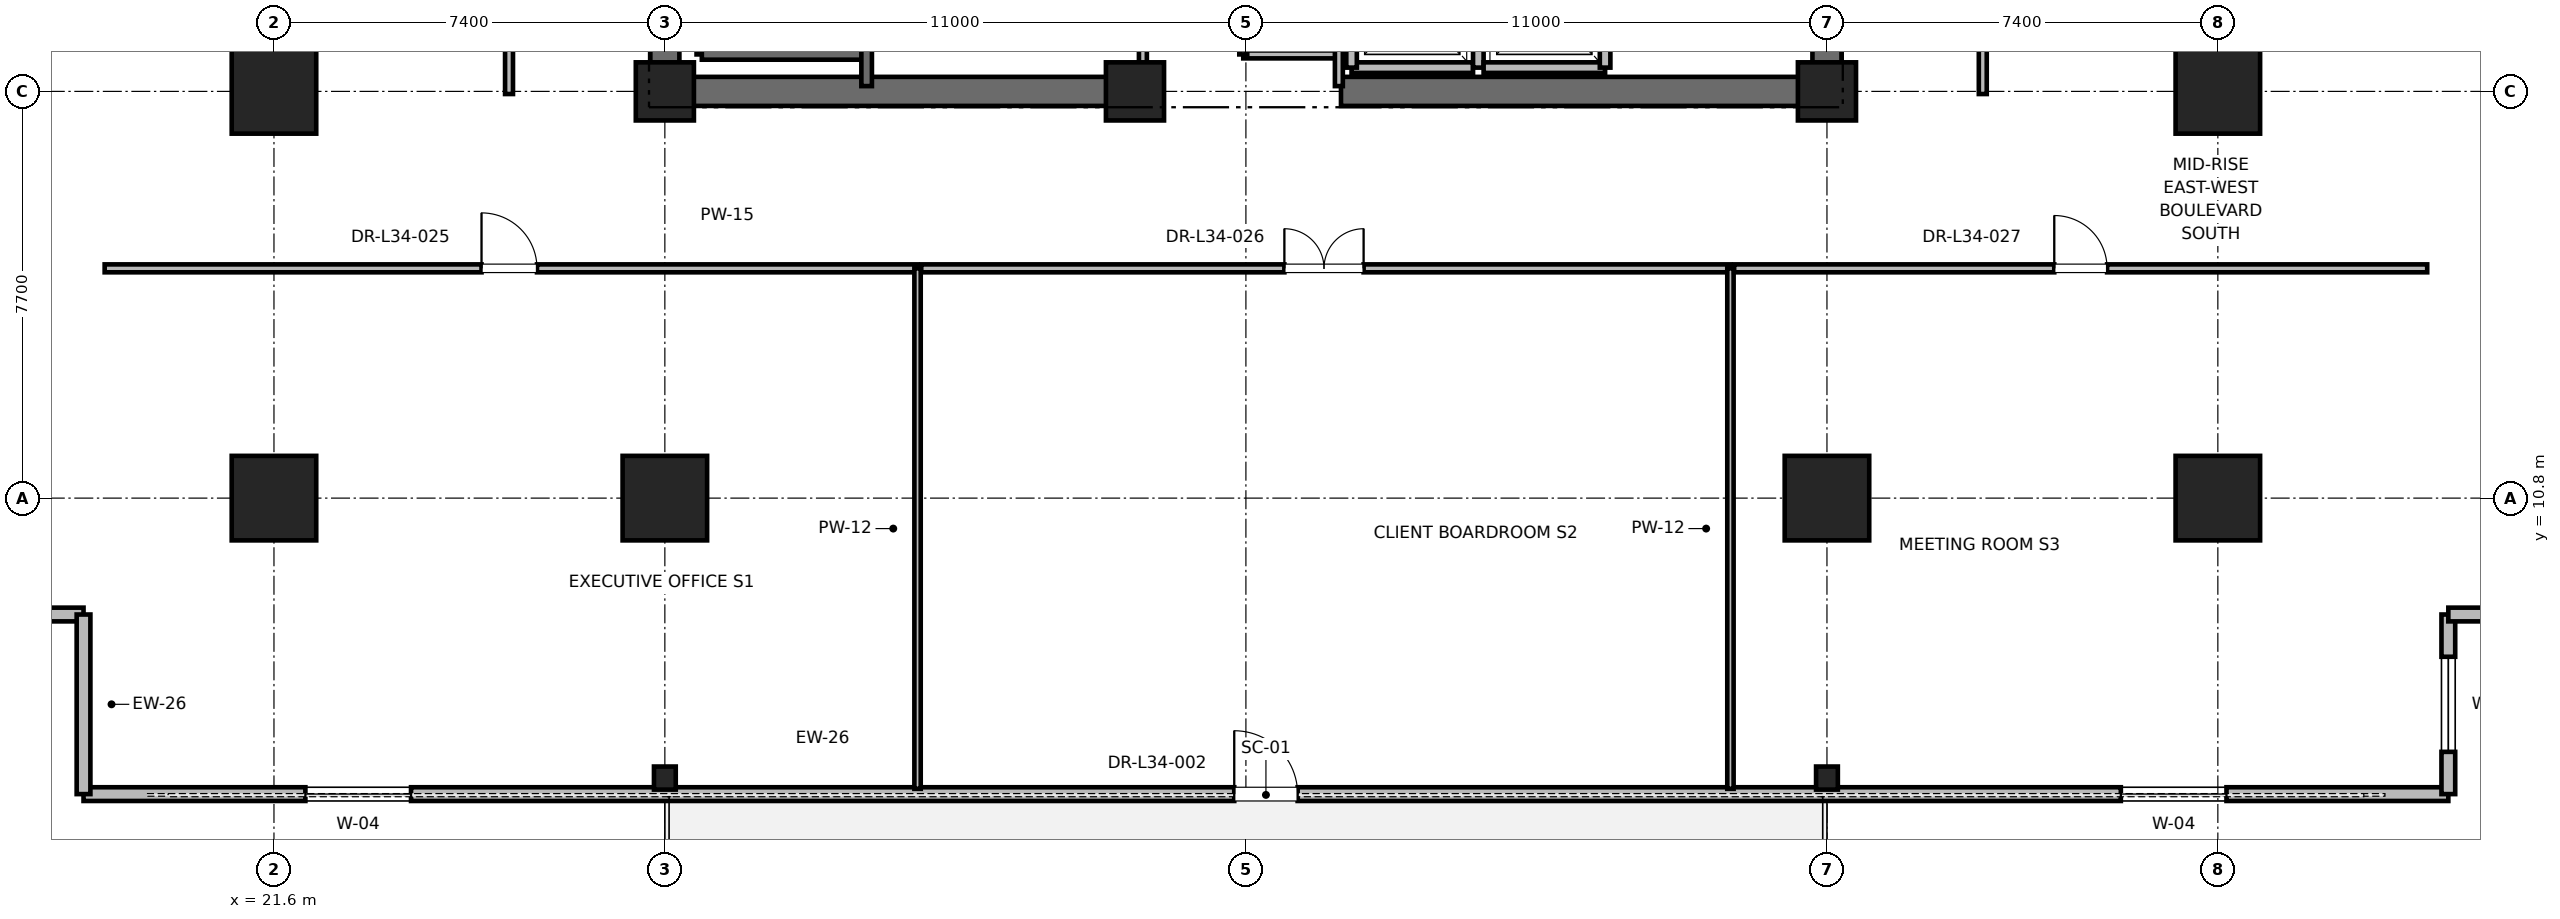
"""IFC4 building model, lengths in metres.
Left out: names, types, materials, properties, quantities, classifications, styles, units other than length and angle.
Written with IfcOpenShell. Run it as: python <this file> out.ifc"""

import sys

from ifc_helpers import new_model, si_unit, direction, frame, frame_2d, origin, origin_2d, place, context, subcontext, project, spatial, rectangle, i_section, extrude, element, fill, save


model = new_model("IFC4")
c1 = context("Model", 3, precision=1e-05, world=origin(), true_north=direction((0.0, 1.0)))
c2 = subcontext(c1, "Body", "Model", "MODEL_VIEW")
j1 = project(units=[si_unit("LENGTHUNIT", "METRE"), si_unit("PLANEANGLEUNIT", "RADIAN")], contexts=[c1])
p1 = place(None, origin())
s1 = spatial("IfcSite", under=j1, at=p1, CompositionType="ELEMENT")
p2 = place(p1, origin())
s2 = spatial("IfcBuilding", under=s1, at=p2, CompositionType="ELEMENT")
p3 = place(p2, frame((0.0, 0.0, 148.4)))
s3 = spatial("IfcBuildingStorey", under=s2, at=p3, CompositionType="ELEMENT", Elevation=148.4)
for number, where, z_axis, x_axis in (
    (1, (29.0, 10.8, 0.0), (0.0, 0.0, 1.0), (1.0, 0.0, 0.0)),
    (2, (51.0, 10.8, 0.0), (0.0, 0.0, 1.0), (1.0, 0.0, 0.0)),
    (3, (21.6, 18.5, 0.0), (0.0, 0.0, 1.0), (1.0, 0.0, 0.0)),
    (4, (58.4, 18.5, 0.0), (0.0, 0.0, 1.0), (1.0, 0.0, 0.0)),
    (5, (21.6, 10.8, 0.0), (0.0, 0.0, 1.0), (1.0, 0.0, 0.0)),
    (6, (58.4, 10.8, 0.0), (0.0, 0.0, 1.0), (1.0, 0.0, 0.0)),
):
    element("IfcColumn", number, at=place(p3, frame(where, z_axis=z_axis, x_axis=x_axis)), inside=s3, PredefinedType="COLUMN", context=c2, shape_type="SweptSolid", body=[
        extrude(rectangle(XDim=1.6, YDim=1.6, at=origin_2d()), origin(), (0.0, 0.0, 1.0), 4.0),
    ])
for number, where, z_axis, x_axis in (
    (7, (29.0, 5.5, 0.0), (0.0, 0.0, 1.0), (1.0, 0.0, 0.0)),
    (8, (51.0, 5.5, 0.0), (0.0, 0.0, 1.0), (1.0, 0.0, 0.0)),
):
    element("IfcColumn", number, at=place(p3, frame(where, z_axis=z_axis, x_axis=x_axis)), inside=s3, PredefinedType="COLUMN", context=c2, shape_type="SweptSolid", body=[
        extrude(i_section(OverallWidth=0.412, OverallDepth=0.437, WebThickness=0.036, FlangeThickness=0.058, FilletRadius=0.015, at=origin_2d()), origin(), (0.0, 0.0, 1.0), 4.0),
    ])
for number, where, z_axis, x_axis in (
    (9, (29.0, 18.5, 0.0), (0.0, 0.0, 1.0), (1.0, 0.0, 0.0)),
    (10, (51.0, 18.5, 0.0), (0.0, 0.0, 1.0), (1.0, 0.0, 0.0)),
    (11, (37.9, 18.5, 0.0), (0.0, 0.0, 1.0), (1.0, 0.0, 0.0)),
):
    element("IfcColumn", number, at=place(p3, frame(where, z_axis=z_axis, x_axis=x_axis)), inside=s3, PredefinedType="PILASTER", context=c2, shape_type="SweptSolid", body=[
        extrude(rectangle(XDim=1.1, YDim=1.1, at=origin_2d()), origin(), (0.0, 0.0, 1.0), 4.0),
    ])
for number, where, z_axis, x_axis in (
    (12, (29.0, 18.5, 0.0), (0.0, 0.0, 1.0), (1.0, 0.0, 0.0)),
    (13, (41.8, 18.5, 0.0), (0.0, 0.0, 1.0), (1.0, 0.0, 0.0)),
):
    element("IfcWall", number, at=place(p3, frame(where, z_axis=z_axis, x_axis=x_axis)), inside=s3, PredefinedType="SHEAR", context=c2, shape_type="SweptSolid", body=[
        extrude(rectangle(XDim=9.2, YDim=0.55, at=frame_2d((4.6, 0.0))), origin(), (0.0, 0.0, 1.0), 3.775),
    ])
p4 = place(p3, frame((29.0, 18.5, 0.0), z_axis=(0.0, 0.0, 1.0), x_axis=(0.0, 1.0, 0.0)))
e14 = element("IfcWall", 14, at=p4, inside=s3, PredefinedType="SHEAR", context=c2, shape_type="SweptSolid", body=[
    extrude(rectangle(XDim=8.8, YDim=0.55, at=frame_2d((4.4, 0.0))), origin(), (0.0, 0.0, 1.0), 3.775),
])
p5 = place(p3, frame((51.0, 18.5, 0.0), z_axis=(0.0, 0.0, 1.0), x_axis=(0.0, 1.0, 0.0)))
e15 = element("IfcWall", 15, at=p5, inside=s3, PredefinedType="SHEAR", context=c2, shape_type="SweptSolid", body=[
    extrude(rectangle(XDim=5.8, YDim=0.55, at=frame_2d((2.9, 0.0))), origin(), (0.0, 0.0, 1.0), 3.775),
])
p6 = place(p3, frame((17.995, 5.196, 0.0), z_axis=(0.0, 0.0, 1.0), x_axis=(1.0, 0.0, 0.0)))
e16 = element("IfcWall", 16, at=p6, inside=s3, PredefinedType="PARAPET", context=c2, shape_type="SweptSolid", body=[
    extrude(rectangle(XDim=44.769, YDim=0.26, at=frame_2d((22.384, 0.0))), origin(), (0.0, 0.0, 1.0), 2.97),
])
p7 = place(p6, frame((4.2, 0.0, 0.85)))
e17 = element("IfcOpeningElement", 17, at=p7, cuts=e16, PredefinedType="OPENING", context=c2, shape_type="SweptSolid", body=[
    extrude(rectangle(XDim=2.0, YDim=2.3, at=frame_2d((1.0, 1.15))), frame((0.0, 0.13, 0.0), z_axis=(0.0, -1.0, 0.0), x_axis=(1.0, 0.0, 0.0)), (0.0, 0.0, 1.0), 0.26),
])
p8 = place(p6, frame((21.784, 0.0, 0.0)))
e18 = element("IfcOpeningElement", 18, at=p8, cuts=e16, PredefinedType="OPENING", context=c2, shape_type="SweptSolid", body=[
    extrude(rectangle(XDim=1.2, YDim=2.2, at=frame_2d((0.6, 1.1))), frame((0.0, 0.13, 0.0), z_axis=(0.0, -1.0, 0.0), x_axis=(1.0, 0.0, 0.0)), (0.0, 0.0, 1.0), 0.26),
])
p9 = place(p6, frame((38.569, 0.0, 0.85)))
e19 = element("IfcOpeningElement", 19, at=p9, cuts=e16, PredefinedType="OPENING", context=c2, shape_type="SweptSolid", body=[
    extrude(rectangle(XDim=2.0, YDim=2.3, at=frame_2d((1.0, 1.15))), frame((0.0, 0.13, 0.0), z_axis=(0.0, -1.0, 0.0), x_axis=(1.0, 0.0, 0.0)), (0.0, 0.0, 1.0), 0.26),
])
p10 = place(p3, frame((14.195, 8.596, 0.0), z_axis=(0.0, 0.0, 1.0), x_axis=(1.0, 0.0, 0.0)))
e20 = element("IfcWall", 20, at=p10, inside=s3, PredefinedType="PARAPET", context=c2, shape_type="SweptSolid", body=[
    extrude(rectangle(XDim=3.8, YDim=0.26, at=frame_2d((1.9, 0.0))), origin(), (0.0, 0.0, 1.0), 3.775),
])
p11 = place(p10, frame((1.0, 0.0, 0.85)))
e21 = element("IfcOpeningElement", 21, at=p11, cuts=e20, PredefinedType="OPENING", context=c2, shape_type="SweptSolid", body=[
    extrude(rectangle(XDim=1.8, YDim=2.2, at=frame_2d((0.9, 1.1))), frame((0.0, 0.13, 0.0), z_axis=(0.0, -1.0, 0.0), x_axis=(1.0, 0.0, 0.0)), (0.0, 0.0, 1.0), 0.26),
])
p12 = place(p3, frame((17.995, 8.596, 0.0), z_axis=(0.0, 0.0, 1.0), x_axis=(0.0, -1.0, 0.0)))
e22 = element("IfcWall", 22, at=p12, inside=s3, PredefinedType="PARAPET", context=c2, shape_type="SweptSolid", body=[
    extrude(rectangle(XDim=3.4, YDim=0.26, at=frame_2d((1.7, 0.0))), origin(), (0.0, 0.0, 1.0), 3.775),
])
p13 = place(p3, frame((62.763, 5.196, 0.0), z_axis=(0.0, 0.0, 1.0), x_axis=(0.0, 1.0, 0.0)))
e23 = element("IfcWall", 23, at=p13, inside=s3, PredefinedType="PARAPET", context=c2, shape_type="SweptSolid", body=[
    extrude(rectangle(XDim=3.4, YDim=0.26, at=frame_2d((1.7, 0.0))), origin(), (0.0, 0.0, 1.0), 3.775),
])
p14 = place(p13, frame((0.8, 0.0, 0.85)))
e24 = element("IfcOpeningElement", 24, at=p14, cuts=e23, PredefinedType="OPENING", context=c2, shape_type="SweptSolid", body=[
    extrude(rectangle(XDim=1.8, YDim=2.2, at=frame_2d((0.9, 1.1))), frame((0.0, 0.13, 0.0), z_axis=(0.0, -1.0, 0.0), x_axis=(1.0, 0.0, 0.0)), (0.0, 0.0, 1.0), 0.26),
])
p15 = place(p3, frame((62.763, 8.596, 0.0), z_axis=(0.0, 0.0, 1.0), x_axis=(1.0, 0.0, 0.0)))
e25 = element("IfcWall", 25, at=p15, inside=s3, PredefinedType="PARAPET", context=c2, shape_type="SweptSolid", body=[
    extrude(rectangle(XDim=3.8, YDim=0.26, at=frame_2d((1.9, 0.0))), origin(), (0.0, 0.0, 1.0), 3.775),
])
p16 = place(p3, frame((29.7, 19.2, 0.0), z_axis=(0.0, 0.0, 1.0), x_axis=(0.0, 1.0, 0.0)))
e26 = element("IfcWall", 26, at=p16, inside=s3, PredefinedType="SOLIDWALL", context=c2, shape_type="SweptSolid", body=[
    extrude(rectangle(XDim=8.15, YDim=0.2, at=frame_2d((4.075, 0.0))), origin(), (0.0, 0.0, 1.0), 3.775),
])
p17 = place(p3, frame((29.7, 19.2, 0.0), z_axis=(0.0, 0.0, 1.0), x_axis=(1.0, 0.0, 0.0)))
e27 = element("IfcWall", 27, at=p17, inside=s3, PredefinedType="SOLIDWALL", context=c2, shape_type="SweptSolid", body=[
    extrude(rectangle(XDim=3.12, YDim=0.2, at=frame_2d((1.56, 0.0))), origin(), (0.0, 0.0, 1.0), 3.775),
])
p18 = place(p3, frame((32.82, 18.6, 0.0), z_axis=(0.0, 0.0, 1.0), x_axis=(0.0, 1.0, 0.0)))
e28 = element("IfcWall", 28, at=p18, inside=s3, PredefinedType="SOLIDWALL", context=c2, shape_type="SweptSolid", body=[
    extrude(rectangle(XDim=8.78, YDim=0.2, at=frame_2d((4.39, 0.0))), origin(), (0.0, 0.0, 1.0), 3.775),
])
p19 = place(p3, frame((42.0, 18.95, 0.0), z_axis=(0.0, 0.0, 1.0), x_axis=(1.0, 0.0, 0.0)))
e29 = element("IfcWall", 29, at=p19, inside=s3, PredefinedType="SOLIDWALL", context=c2, shape_type="SweptSolid", body=[
    extrude(rectangle(XDim=2.3, YDim=0.2, at=frame_2d((1.15, 0.0))), origin(), (0.0, 0.0, 1.0), 2.755),
])
p20 = place(p3, frame((42.0, 21.55, 0.0), z_axis=(0.0, 0.0, 1.0), x_axis=(0.0, -1.0, 0.0)))
e30 = element("IfcWall", 30, at=p20, inside=s3, PredefinedType="SOLIDWALL", context=c2, shape_type="SweptSolid", body=[
    extrude(rectangle(XDim=2.6, YDim=0.2, at=frame_2d((1.3, 0.0))), origin(), (0.0, 0.0, 1.0), 2.755),
])
p21 = place(p3, frame((44.4, 18.95, 0.0), z_axis=(0.0, 0.0, 1.0), x_axis=(0.0, 1.0, 0.0)))
e31 = element("IfcWall", 31, at=p21, inside=s3, PredefinedType="SOLIDWALL", context=c2, shape_type="SweptSolid", body=[
    extrude(rectangle(XDim=2.6, YDim=0.2, at=frame_2d((1.3, 0.0))), origin(), (0.0, 0.0, 1.0), 3.775),
])
p22 = place(p3, frame((44.5, 18.95, 0.0), z_axis=(0.0, 0.0, 1.0), x_axis=(1.0, 0.0, 0.0)))
e32 = element("IfcWall", 32, at=p22, inside=s3, PredefinedType="SOLIDWALL", context=c2, shape_type="SweptSolid", body=[
    extrude(rectangle(XDim=2.3, YDim=0.2, at=frame_2d((1.15, 0.0))), origin(), (0.0, 0.0, 1.0), 3.775),
])
p23 = place(p3, frame((46.8, 18.95, 0.0), z_axis=(0.0, 0.0, 1.0), x_axis=(0.0, 1.0, 0.0)))
e33 = element("IfcWall", 33, at=p23, inside=s3, PredefinedType="SOLIDWALL", context=c2, shape_type="SweptSolid", body=[
    extrude(rectangle(XDim=2.6, YDim=0.2, at=frame_2d((1.3, 0.0))), origin(), (0.0, 0.0, 1.0), 3.775),
])
p24 = place(p3, frame((39.95, 19.2, 0.0), z_axis=(0.0, 0.0, 1.0), x_axis=(1.0, 0.0, 0.0)))
e34 = element("IfcWall", 34, at=p24, inside=s3, PredefinedType="PARTITIONING", context=c2, shape_type="SweptSolid", body=[
    extrude(rectangle(XDim=1.81, YDim=0.15, at=frame_2d((0.905, 0.0))), origin(), (0.0, 0.0, 1.0), 2.85),
])
p25 = place(p3, frame((41.76, 18.6, 0.0), z_axis=(0.0, 0.0, 1.0), x_axis=(0.0, 1.0, 0.0)))
e35 = element("IfcWall", 35, at=p25, inside=s3, PredefinedType="PARTITIONING", context=c2, shape_type="SweptSolid", body=[
    extrude(rectangle(XDim=3.6, YDim=0.15, at=frame_2d((1.8, 0.0))), origin(), (0.0, 0.0, 1.0), 2.755),
])
p26 = place(p3, frame((39.95, 19.2, 0.0), z_axis=(0.0, 0.0, 1.0), x_axis=(0.0, 1.0, 0.0)))
e36 = element("IfcWall", 36, at=p26, inside=s3, PredefinedType="PARTITIONING", context=c2, shape_type="SweptSolid", body=[
    extrude(rectangle(XDim=3.0, YDim=0.15, at=frame_2d((1.5, 0.0))), origin(), (0.0, 0.0, 1.0), 2.85),
])
p27 = place(p26, frame((1.05, 0.0, 0.0)))
e37 = element("IfcOpeningElement", 37, at=p27, cuts=e36, PredefinedType="OPENING", context=c2, shape_type="SweptSolid", body=[
    extrude(rectangle(XDim=0.9, YDim=2.1, at=frame_2d((0.45, 1.05))), frame((0.0, 0.075, 0.0), z_axis=(0.0, -1.0, 0.0), x_axis=(1.0, 0.0, 0.0)), (0.0, 0.0, 1.0), 0.15),
])
p28 = place(p3, frame((38.05, 18.6, 0.0), z_axis=(0.0, 0.0, 1.0), x_axis=(0.0, 1.0, 0.0)))
e38 = element("IfcWall", 38, at=p28, inside=s3, PredefinedType="PARTITIONING", context=c2, shape_type="SweptSolid", body=[
    extrude(rectangle(XDim=3.06, YDim=0.15, at=frame_2d((1.53, 0.0))), origin(), (0.0, 0.0, 1.0), 2.755),
])
p29 = place(p28, frame((1.03, 0.0, 0.0)))
e39 = element("IfcOpeningElement", 39, at=p29, cuts=e38, PredefinedType="OPENING", context=c2, shape_type="SweptSolid", body=[
    extrude(rectangle(XDim=1.0, YDim=2.15, at=frame_2d((0.5, 1.075))), frame((0.0, 0.075, 0.0), z_axis=(0.0, -1.0, 0.0), x_axis=(1.0, 0.0, 0.0)), (0.0, 0.0, 1.0), 0.15),
])
p30 = place(p3, frame((18.395, 15.15, 0.0), z_axis=(0.0, 0.0, 1.0), x_axis=(1.0, 0.0, 0.0)))
e40 = element("IfcWall", 40, at=p30, inside=s3, PredefinedType="PARTITIONING", context=c2, shape_type="SweptSolid", body=[
    extrude(rectangle(XDim=15.389, YDim=0.15, at=frame_2d((7.694, 0.0))), origin(), (0.0, 0.0, 1.0), 2.85),
])
p31 = place(p30, frame((7.135, 0.0, 0.0)))
e41 = element("IfcOpeningElement", 41, at=p31, cuts=e40, PredefinedType="OPENING", context=c2, shape_type="SweptSolid", body=[
    extrude(rectangle(XDim=1.05, YDim=2.2, at=frame_2d((0.525, 1.1))), frame((0.0, 0.075, 0.0), z_axis=(0.0, -1.0, 0.0), x_axis=(1.0, 0.0, 0.0)), (0.0, 0.0, 1.0), 0.15),
])
p32 = place(p3, frame((33.784, 5.296, 0.0), z_axis=(0.0, 0.0, 1.0), x_axis=(0.0, 1.0, 0.0)))
e42 = element("IfcWall", 42, at=p32, inside=s3, PredefinedType="PARTITIONING", context=c2, shape_type="SweptSolid", body=[
    extrude(rectangle(XDim=9.854, YDim=0.12, at=frame_2d((4.927, 0.0))), origin(), (0.0, 0.0, 1.0), 2.405),
])
p33 = place(p3, frame((33.854, 15.15, 0.0), z_axis=(0.0, 0.0, 1.0), x_axis=(1.0, 0.0, 0.0)))
e43 = element("IfcWall", 43, at=p33, inside=s3, PredefinedType="PARTITIONING", context=c2, shape_type="SweptSolid", body=[
    extrude(rectangle(XDim=15.319, YDim=0.15, at=frame_2d((7.66, 0.0))), origin(), (0.0, 0.0, 1.0), 2.85),
])
p34 = place(p33, frame((6.875, 0.0, 0.0)))
e44 = element("IfcOpeningElement", 44, at=p34, cuts=e43, PredefinedType="OPENING", context=c2, shape_type="SweptSolid", body=[
    extrude(rectangle(XDim=1.5, YDim=2.25, at=frame_2d((0.75, 1.125))), frame((0.0, 0.075, 0.0), z_axis=(0.0, -1.0, 0.0), x_axis=(1.0, 0.0, 0.0)), (0.0, 0.0, 1.0), 0.15),
])
p35 = place(p3, frame((49.173, 5.296, 0.0), z_axis=(0.0, 0.0, 1.0), x_axis=(0.0, 1.0, 0.0)))
e45 = element("IfcWall", 45, at=p35, inside=s3, PredefinedType="PARTITIONING", context=c2, shape_type="SweptSolid", body=[
    extrude(rectangle(XDim=9.854, YDim=0.12, at=frame_2d((4.927, 0.0))), origin(), (0.0, 0.0, 1.0), 2.405),
])
p36 = place(p3, frame((49.243, 15.15, 0.0), z_axis=(0.0, 0.0, 1.0), x_axis=(1.0, 0.0, 0.0)))
e46 = element("IfcWall", 46, at=p36, inside=s3, PredefinedType="PARTITIONING", context=c2, shape_type="SweptSolid", body=[
    extrude(rectangle(XDim=13.121, YDim=0.15, at=frame_2d((6.56, 0.0))), origin(), (0.0, 0.0, 1.0), 2.85),
])
p37 = place(p36, frame((6.06, 0.0, 0.0)))
e47 = element("IfcOpeningElement", 47, at=p37, cuts=e46, PredefinedType="OPENING", context=c2, shape_type="SweptSolid", body=[
    extrude(rectangle(XDim=1.0, YDim=2.15, at=frame_2d((0.5, 1.075))), frame((0.0, 0.075, 0.0), z_axis=(0.0, -1.0, 0.0), x_axis=(1.0, 0.0, 0.0)), (0.0, 0.0, 1.0), 0.15),
])
p38 = place(p3, frame((26.05, 18.45, 0.0), z_axis=(0.0, 0.0, 1.0), x_axis=(0.0, 1.0, 0.0)))
e48 = element("IfcWall", 48, at=p38, inside=s3, PredefinedType="PARTITIONING", context=c2, shape_type="SweptSolid", body=[
    extrude(rectangle(XDim=18.1, YDim=0.15, at=frame_2d((9.05, 0.0))), origin(), (0.0, 0.0, 1.0), 2.85),
])
p39 = place(p38, frame((8.55, 0.0, 0.0)))
e49 = element("IfcOpeningElement", 49, at=p39, cuts=e48, PredefinedType="OPENING", context=c2, shape_type="SweptSolid", body=[
    extrude(rectangle(XDim=1.0, YDim=2.15, at=frame_2d((0.5, 1.075))), frame((0.0, 0.075, 0.0), z_axis=(0.0, -1.0, 0.0), x_axis=(1.0, 0.0, 0.0)), (0.0, 0.0, 1.0), 0.15),
])
p40 = place(p3, frame((53.95, 18.45, 0.0), z_axis=(0.0, 0.0, 1.0), x_axis=(0.0, 1.0, 0.0)))
e50 = element("IfcWall", 50, at=p40, inside=s3, PredefinedType="PARTITIONING", context=c2, shape_type="SweptSolid", body=[
    extrude(rectangle(XDim=18.1, YDim=0.15, at=frame_2d((9.05, 0.0))), origin(), (0.0, 0.0, 1.0), 2.85),
])
p41 = place(p40, frame((8.55, 0.0, 0.0)))
e51 = element("IfcOpeningElement", 51, at=p41, cuts=e50, PredefinedType="OPENING", context=c2, shape_type="SweptSolid", body=[
    extrude(rectangle(XDim=1.0, YDim=2.15, at=frame_2d((0.5, 1.075))), frame((0.0, 0.075, 0.0), z_axis=(0.0, -1.0, 0.0), x_axis=(1.0, 0.0, 0.0)), (0.0, 0.0, 1.0), 0.15),
])
p42 = place(p7, origin())
e52 = element("IfcWindow", 52, at=p42, inside=s3, PartitioningType="SINGLE_PANEL", PredefinedType="WINDOW", context=c2, shape_type="SweptSolid", body=[
    extrude(rectangle(XDim=2.0, YDim=2.3, at=frame_2d((1.0, 1.15))), frame((0.0, 0.03, 0.0), z_axis=(0.0, -1.0, 0.0), x_axis=(1.0, 0.0, 0.0)), (0.0, 0.0, 1.0), 0.06),
])
fill(e17, e52)
p43 = place(p8, origin())
e53 = element("IfcDoor", 53, at=p43, inside=s3, OperationType="SINGLE_SWING_LEFT", PredefinedType="DOOR", context=c2, shape_type="SweptSolid", body=[
    extrude(rectangle(XDim=1.2, YDim=2.2, at=frame_2d((0.6, 1.1))), frame((0.0, 0.025, 0.0), z_axis=(0.0, -1.0, 0.0), x_axis=(1.0, 0.0, 0.0)), (0.0, 0.0, 1.0), 0.05),
])
fill(e18, e53)
p44 = place(p9, origin())
e54 = element("IfcWindow", 54, at=p44, inside=s3, PartitioningType="SINGLE_PANEL", PredefinedType="WINDOW", context=c2, shape_type="SweptSolid", body=[
    extrude(rectangle(XDim=2.0, YDim=2.3, at=frame_2d((1.0, 1.15))), frame((0.0, 0.03, 0.0), z_axis=(0.0, -1.0, 0.0), x_axis=(1.0, 0.0, 0.0)), (0.0, 0.0, 1.0), 0.06),
])
fill(e19, e54)
p45 = place(p14, origin())
e55 = element("IfcWindow", 55, at=p45, inside=s3, PartitioningType="SINGLE_PANEL", PredefinedType="WINDOW", context=c2, shape_type="SweptSolid", body=[
    extrude(rectangle(XDim=1.8, YDim=2.2, at=frame_2d((0.9, 1.1))), frame((0.0, 0.03, 0.0), z_axis=(0.0, -1.0, 0.0), x_axis=(1.0, 0.0, 0.0)), (0.0, 0.0, 1.0), 0.06),
])
fill(e24, e55)
p46 = place(p31, origin())
e56 = element("IfcDoor", 56, at=p46, inside=s3, OperationType="SINGLE_SWING_LEFT", PredefinedType="DOOR", context=c2, shape_type="SweptSolid", body=[
    extrude(rectangle(XDim=1.05, YDim=2.2, at=frame_2d((0.525, 1.1))), frame((0.0, 0.025, 0.0), z_axis=(0.0, -1.0, 0.0), x_axis=(1.0, 0.0, 0.0)), (0.0, 0.0, 1.0), 0.05),
])
fill(e41, e56)
p47 = place(p34, origin())
e57 = element("IfcDoor", 57, at=p47, inside=s3, OperationType="DOUBLE_DOOR_SINGLE_SWING", PredefinedType="DOOR", context=c2, shape_type="SweptSolid", body=[
    extrude(rectangle(XDim=1.5, YDim=2.25, at=frame_2d((0.75, 1.125))), frame((0.0, 0.025, 0.0), z_axis=(0.0, -1.0, 0.0), x_axis=(1.0, 0.0, 0.0)), (0.0, 0.0, 1.0), 0.05),
])
fill(e44, e57)
p48 = place(p37, origin())
e58 = element("IfcDoor", 58, at=p48, inside=s3, OperationType="SINGLE_SWING_LEFT", PredefinedType="DOOR", context=c2, shape_type="SweptSolid", body=[
    extrude(rectangle(XDim=1.0, YDim=2.15, at=frame_2d((0.5, 1.075))), frame((0.0, 0.025, 0.0), z_axis=(0.0, -1.0, 0.0), x_axis=(1.0, 0.0, 0.0)), (0.0, 0.0, 1.0), 0.05),
])
fill(e47, e58)
save(model, sys.argv[1])
